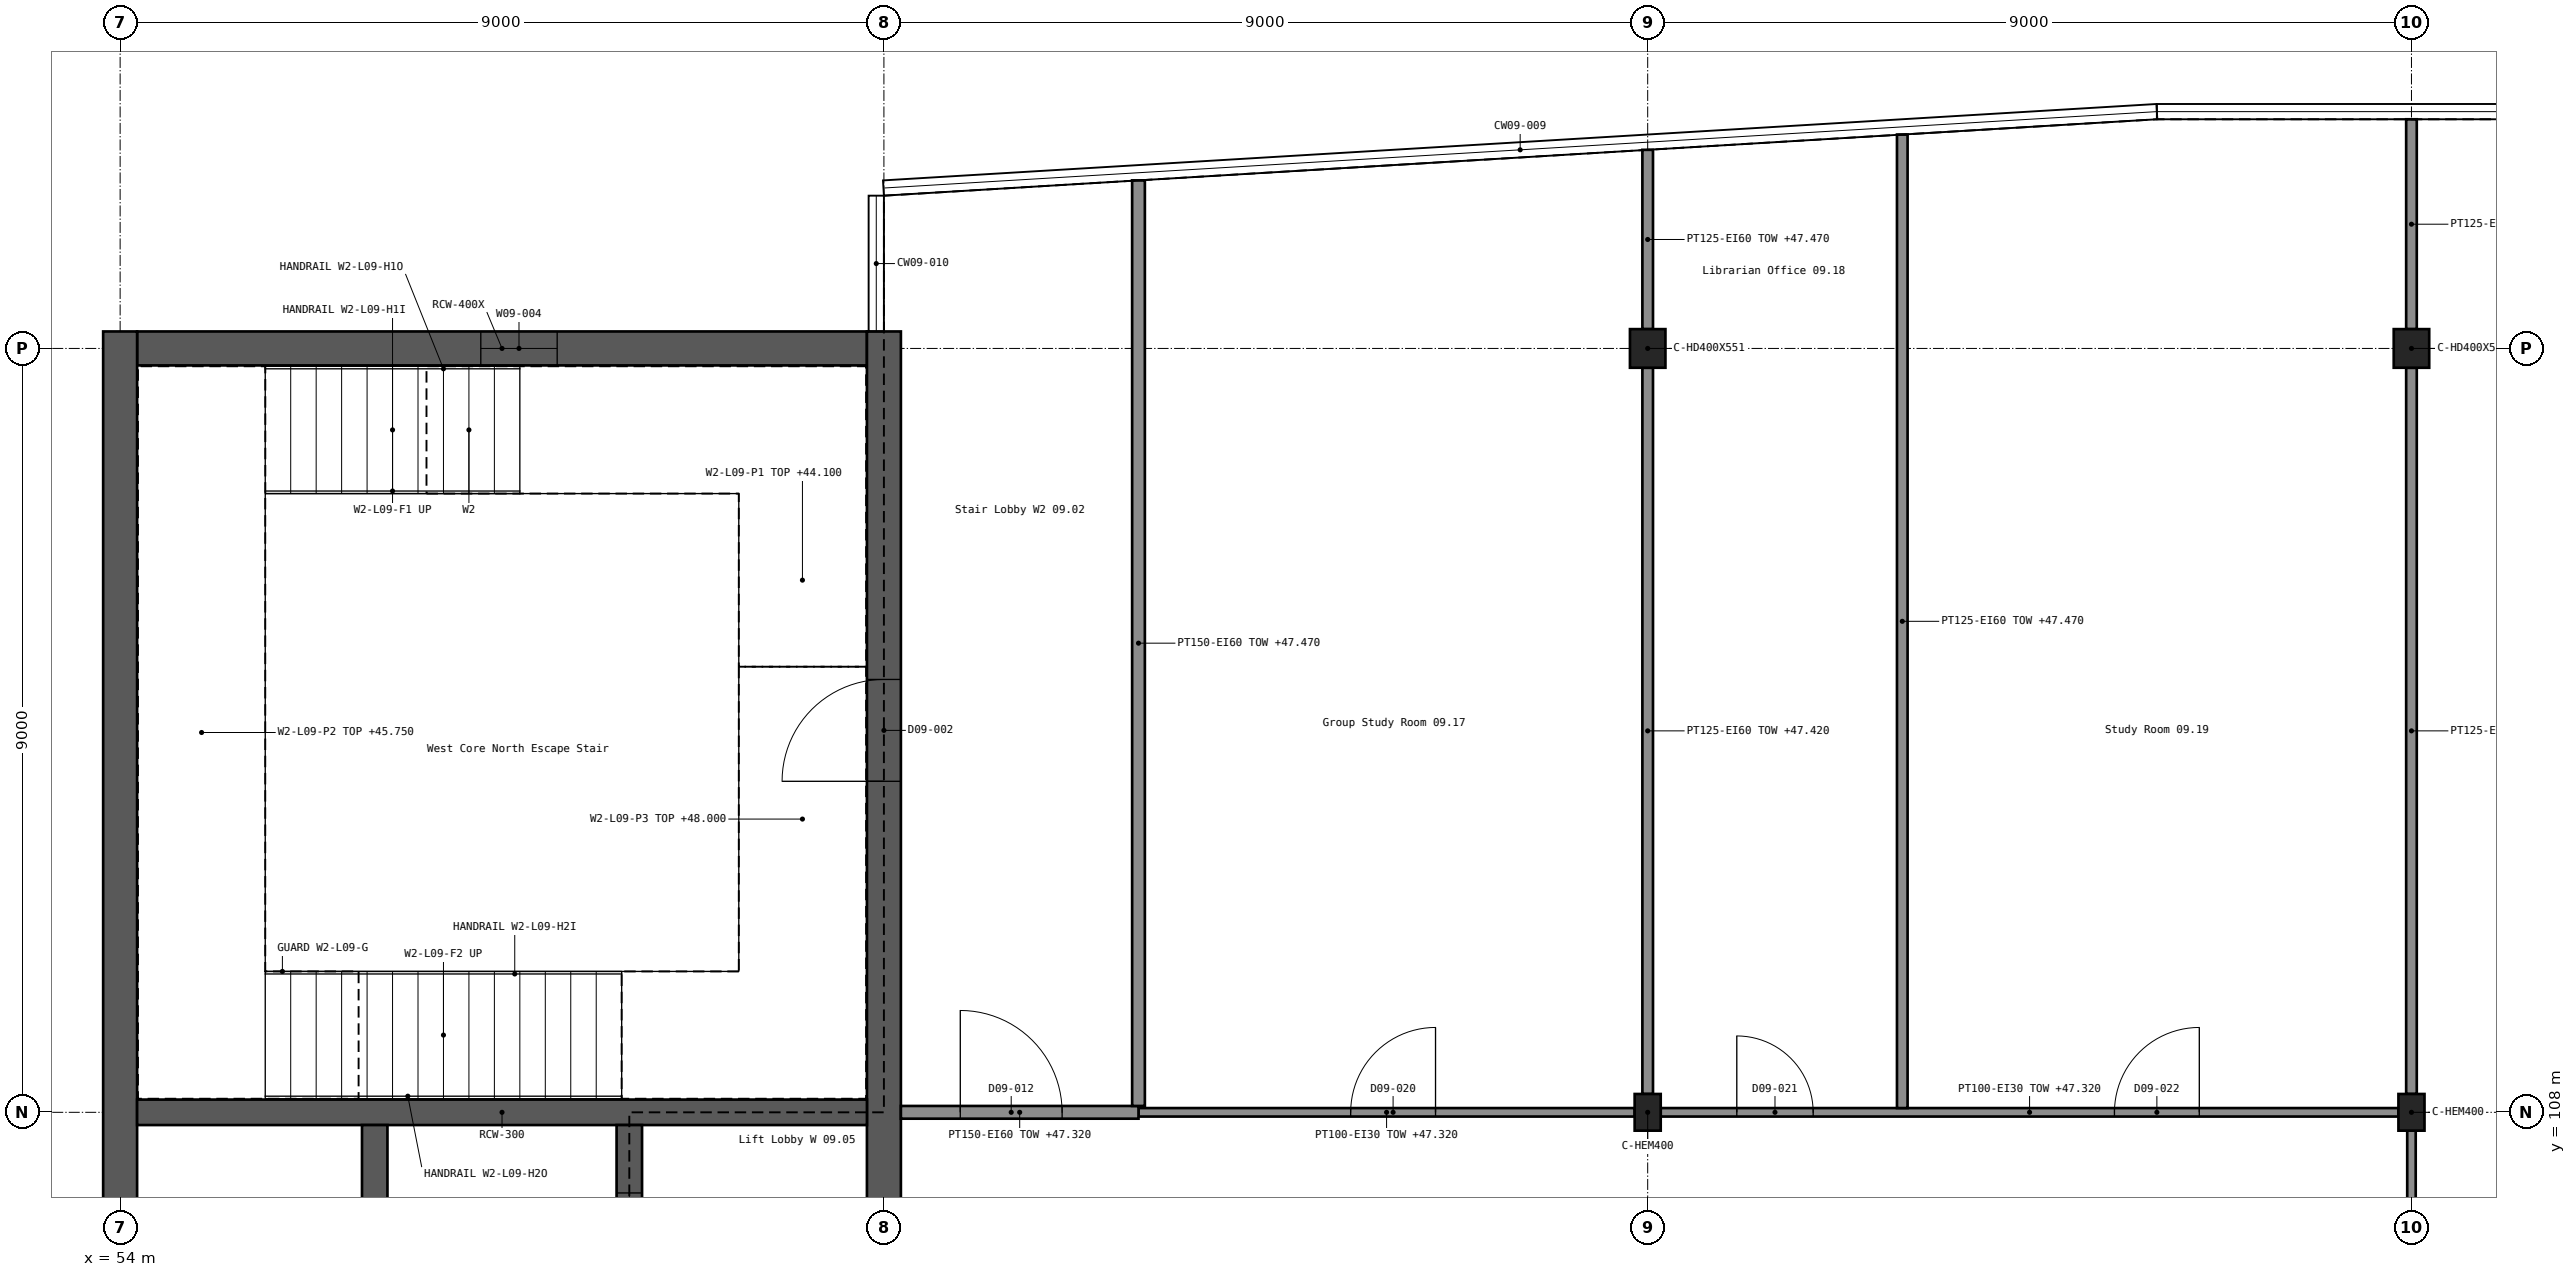
"""IFC4 building model, lengths in metres.
Left out: names, types, materials, properties, quantities, classifications, styles, units other than length and angle.
Written with IfcOpenShell. Run it as: python <this file> out.ifc"""

import sys

from ifc_helpers import new_model, si_unit, direction, frame, frame_2d, origin, origin_2d, place, context, subcontext, project, spatial, rectangle, i_section, extrude, element, fill, save


model = new_model("IFC4")
c1 = context("Model", 3, precision=1e-05, world=origin(), true_north=direction((0.0, 1.0)))
c2 = subcontext(c1, "Body", "Model", "MODEL_VIEW")
j1 = project(units=[si_unit("LENGTHUNIT", "METRE"), si_unit("PLANEANGLEUNIT", "RADIAN")], contexts=[c1])
p1 = place(None, origin())
s1 = spatial("IfcSite", under=j1, at=p1, CompositionType="ELEMENT")
p2 = place(p1, origin())
s2 = spatial("IfcBuilding", under=s1, at=p2, CompositionType="ELEMENT")
p3 = place(p2, frame((0.0, 0.0, 44.1)))
s3 = spatial("IfcBuildingStorey", under=s2, at=p3, CompositionType="ELEMENT", Elevation=44.1)
p4 = place(p3, frame((54.2, 117.0, 0.0), z_axis=(0.0, 0.0, 1.0), x_axis=(1.0, 0.0, 0.0)))
e1 = element("IfcWall", 1, at=p4, inside=s3, PredefinedType="SHEAR", context=c2, shape_type="SweptSolid", body=[
    extrude(rectangle(XDim=8.6, YDim=0.4, at=frame_2d((4.3, 0.0))), origin(), (0.0, 0.0, 1.0), 3.9),
])
p5 = place(p4, frame((4.05, 0.0, 1.2)))
e2 = element("IfcOpeningElement", 2, at=p5, cuts=e1, PredefinedType="OPENING", context=c2, shape_type="SweptSolid", body=[
    extrude(rectangle(XDim=0.9, YDim=1.5, at=frame_2d((0.45, 0.75))), frame((0.0, 0.211, 0.0), z_axis=(0.0, -1.0, 0.0), x_axis=(1.0, 0.0, 0.0)), (0.0, 0.0, 1.0), 0.422),
])
p6 = place(p3, frame((54.0, 89.8, 0.0), z_axis=(0.0, 0.0, 1.0), x_axis=(0.0, 1.0, 0.0)))
e3 = element("IfcWall", 3, at=p6, inside=s3, PredefinedType="SHEAR", context=c2, shape_type="SweptSolid", body=[
    extrude(rectangle(XDim=27.4, YDim=0.4, at=frame_2d((13.7, 0.0))), origin(), (0.0, 0.0, 1.0), 3.9),
])
p7 = place(p3, frame((63.0, 89.8, 0.0), z_axis=(0.0, 0.0, 1.0), x_axis=(0.0, 1.0, 0.0)))
e4 = element("IfcWall", 4, at=p7, inside=s3, PredefinedType="SHEAR", context=c2, shape_type="SweptSolid", body=[
    extrude(rectangle(XDim=27.4, YDim=0.4, at=frame_2d((13.7, 0.0))), origin(), (0.0, 0.0, 1.0), 3.9),
])
p8 = place(p7, frame((4.1, 0.0, 0.0)))
e5 = element("IfcOpeningElement", 5, at=p8, cuts=e4, PredefinedType="OPENING", context=c2, shape_type="SweptSolid", body=[
    extrude(rectangle(XDim=1.2, YDim=2.1, at=frame_2d((0.6, 1.05))), frame((0.0, 0.211, 0.0), z_axis=(0.0, -1.0, 0.0), x_axis=(1.0, 0.0, 0.0)), (0.0, 0.0, 1.0), 0.422),
])
p9 = place(p7, frame((22.1, 0.0, 0.0)))
e6 = element("IfcOpeningElement", 6, at=p9, cuts=e4, PredefinedType="OPENING", context=c2, shape_type="SweptSolid", body=[
    extrude(rectangle(XDim=1.2, YDim=2.1, at=frame_2d((0.6, 1.05))), frame((0.0, 0.211, 0.0), z_axis=(0.0, -1.0, 0.0), x_axis=(1.0, 0.0, 0.0)), (0.0, 0.0, 1.0), 0.422),
])
p10 = place(p7, frame((12.5, 0.0, 0.0)))
e7 = element("IfcOpeningElement", 7, at=p10, cuts=e4, PredefinedType="OPENING", context=c2, shape_type="SweptSolid", body=[
    extrude(rectangle(XDim=2.0, YDim=2.1, at=frame_2d((1.0, 1.05))), frame((0.0, 0.211, 0.0), z_axis=(0.0, -1.0, 0.0), x_axis=(1.0, 0.0, 0.0)), (0.0, 0.0, 1.0), 0.422),
])
p11 = place(p3, frame((54.2, 108.0, 0.0), z_axis=(0.0, 0.0, 1.0), x_axis=(1.0, 0.0, 0.0)))
e8 = element("IfcWall", 8, at=p11, inside=s3, PredefinedType="SHEAR", context=c2, shape_type="SweptSolid", body=[
    extrude(rectangle(XDim=8.6, YDim=0.3, at=frame_2d((4.3, 0.0))), origin(), (0.0, 0.0, 1.0), 3.9),
])
p12 = place(p3, frame((57.0, 99.15, 0.0), z_axis=(0.0, 0.0, 1.0), x_axis=(0.0, 1.0, 0.0)))
e9 = element("IfcWall", 9, at=p12, inside=s3, PredefinedType="SHEAR", context=c2, shape_type="SweptSolid", body=[
    extrude(rectangle(XDim=8.7, YDim=0.3, at=frame_2d((4.35, 0.0))), origin(), (0.0, 0.0, 1.0), 3.9),
])
p13 = place(p3, frame((60.0, 99.15, 0.0), z_axis=(0.0, 0.0, 1.0), x_axis=(0.0, 1.0, 0.0)))
e10 = element("IfcWall", 10, at=p13, inside=s3, PredefinedType="SHEAR", context=c2, shape_type="SweptSolid", body=[
    extrude(rectangle(XDim=8.7, YDim=0.3, at=frame_2d((4.35, 0.0))), origin(), (0.0, 0.0, 1.0), 3.9),
])
p14 = place(p13, frame((0.8, 0.0, 0.0)))
e11 = element("IfcOpeningElement", 11, at=p14, cuts=e10, PredefinedType="OPENING", context=c2, shape_type="SweptSolid", body=[
    extrude(rectangle(XDim=1.1, YDim=2.1, at=frame_2d((0.55, 1.05))), frame((0.0, 0.161, 0.0), z_axis=(0.0, -1.0, 0.0), x_axis=(1.0, 0.0, 0.0)), (0.0, 0.0, 1.0), 0.322),
])
p15 = place(p13, frame((3.8, 0.0, 0.0)))
e12 = element("IfcOpeningElement", 12, at=p15, cuts=e10, PredefinedType="OPENING", context=c2, shape_type="SweptSolid", body=[
    extrude(rectangle(XDim=1.1, YDim=2.1, at=frame_2d((0.55, 1.05))), frame((0.0, 0.161, 0.0), z_axis=(0.0, -1.0, 0.0), x_axis=(1.0, 0.0, 0.0)), (0.0, 0.0, 1.0), 0.322),
])
p16 = place(p13, frame((6.8, 0.0, 0.0)))
e13 = element("IfcOpeningElement", 13, at=p16, cuts=e10, PredefinedType="OPENING", context=c2, shape_type="SweptSolid", body=[
    extrude(rectangle(XDim=1.1, YDim=2.1, at=frame_2d((0.55, 1.05))), frame((0.0, 0.161, 0.0), z_axis=(0.0, -1.0, 0.0), x_axis=(1.0, 0.0, 0.0)), (0.0, 0.0, 1.0), 0.322),
])
for number, where, z_axis, x_axis in (
    (14, (72.0, 108.0, 0.0), (0.0, 0.0, 1.0), (1.0, 0.0, 0.0)),
    (15, (81.0, 108.0, 0.0), (0.0, 0.0, 1.0), (1.0, 0.0, 0.0)),
):
    element("IfcColumn", number, at=place(p3, frame(where, z_axis=z_axis, x_axis=x_axis)), inside=s3, PredefinedType="COLUMN", context=c2, shape_type="SweptSolid", body=[
        extrude(i_section(OverallWidth=0.307, OverallDepth=0.432, WebThickness=0.021, FlangeThickness=0.04, FilletRadius=0.027, at=origin_2d()), origin(), (0.0, 0.0, 1.0), 3.9),
    ])
for number, where, z_axis, x_axis in (
    (16, (72.0, 117.0, 0.0), (0.0, 0.0, 1.0), (1.0, 0.0, 0.0)),
    (17, (81.0, 117.0, 0.0), (0.0, 0.0, 1.0), (1.0, 0.0, 0.0)),
):
    element("IfcColumn", number, at=place(p3, frame(where, z_axis=z_axis, x_axis=x_axis)), inside=s3, PredefinedType="COLUMN", context=c2, shape_type="SweptSolid", body=[
        extrude(i_section(OverallWidth=0.418, OverallDepth=0.455, WebThickness=0.042, FlangeThickness=0.068, FilletRadius=0.015, at=origin_2d()), origin(), (0.0, 0.0, 1.0), 3.9),
    ])
p17 = place(p3, frame((66.0, 108.0, 0.0), z_axis=(0.0, 0.0, 1.0), x_axis=(1.0, 0.0, 0.0)))
e18 = element("IfcWall", 18, at=p17, inside=s3, PredefinedType="PARTITIONING", context=c2, shape_type="SweptSolid", body=[
    extrude(rectangle(XDim=5.846, YDim=0.1, at=frame_2d((2.923, 0.0))), origin(), (0.0, 0.0, 1.0), 3.22),
])
p18 = place(p17, frame((2.5, 0.0, 0.0)))
e19 = element("IfcOpeningElement", 19, at=p18, cuts=e18, PredefinedType="OPENING", context=c2, shape_type="SweptSolid", body=[
    extrude(rectangle(XDim=1.0, YDim=2.1, at=frame_2d((0.5, 1.05))), frame((0.0, 0.061, 0.0), z_axis=(0.0, -1.0, 0.0), x_axis=(1.0, 0.0, 0.0)), (0.0, 0.0, 1.0), 0.122),
])
p19 = place(p3, frame((72.154, 108.0, 0.0), z_axis=(0.0, 0.0, 1.0), x_axis=(1.0, 0.0, 0.0)))
e20 = element("IfcWall", 20, at=p19, inside=s3, PredefinedType="PARTITIONING", context=c2, shape_type="SweptSolid", body=[
    extrude(rectangle(XDim=8.693, YDim=0.1, at=frame_2d((4.346, 0.0))), origin(), (0.0, 0.0, 1.0), 3.22),
])
p20 = place(p19, frame((0.896, 0.0, 0.0)))
e21 = element("IfcOpeningElement", 21, at=p20, cuts=e20, PredefinedType="OPENING", context=c2, shape_type="SweptSolid", body=[
    extrude(rectangle(XDim=0.9, YDim=2.1, at=frame_2d((0.45, 1.05))), frame((0.0, 0.061, 0.0), z_axis=(0.0, -1.0, 0.0), x_axis=(1.0, 0.0, 0.0)), (0.0, 0.0, 1.0), 0.122),
])
p21 = place(p19, frame((5.346, 0.0, 0.0)))
e22 = element("IfcOpeningElement", 22, at=p21, cuts=e20, PredefinedType="OPENING", context=c2, shape_type="SweptSolid", body=[
    extrude(rectangle(XDim=1.0, YDim=2.1, at=frame_2d((0.5, 1.05))), frame((0.0, 0.061, 0.0), z_axis=(0.0, -1.0, 0.0), x_axis=(1.0, 0.0, 0.0)), (0.0, 0.0, 1.0), 0.122),
])
p22 = place(p3, frame((63.2, 108.0, 0.0), z_axis=(0.0, 0.0, 1.0), x_axis=(1.0, 0.0, 0.0)))
e23 = element("IfcWall", 23, at=p22, inside=s3, PredefinedType="PARTITIONING", context=c2, shape_type="SweptSolid", body=[
    extrude(rectangle(XDim=2.8, YDim=0.15, at=frame_2d((1.4, 0.0))), origin(), (0.0, 0.0, 1.0), 3.22),
])
p23 = place(p22, frame((0.7, 0.0, 0.0)))
e24 = element("IfcOpeningElement", 24, at=p23, cuts=e23, PredefinedType="OPENING", context=c2, shape_type="SweptSolid", body=[
    extrude(rectangle(XDim=1.2, YDim=2.1, at=frame_2d((0.6, 1.05))), frame((0.0, 0.086, 0.0), z_axis=(0.0, -1.0, 0.0), x_axis=(1.0, 0.0, 0.0)), (0.0, 0.0, 1.0), 0.172),
])
p24 = place(p3, frame((66.0, 108.075, 0.0), z_axis=(0.0, 0.0, 1.0), x_axis=(0.0, 1.0, 0.0)))
e25 = element("IfcWall", 25, at=p24, inside=s3, PredefinedType="PARTITIONING", context=c2, shape_type="SweptSolid", body=[
    extrude(rectangle(XDim=10.905, YDim=0.15, at=frame_2d((5.453, 0.0))), origin(), (0.0, 0.0, 1.0), 3.37),
])
p25 = place(p3, frame((72.0, 108.216, 0.0), z_axis=(0.0, 0.0, 1.0), x_axis=(0.0, 1.0, 0.0)))
e26 = element("IfcWall", 26, at=p25, inside=s3, PredefinedType="PARTITIONING", context=c2, shape_type="SweptSolid", body=[
    extrude(rectangle(XDim=8.556, YDim=0.125, at=frame_2d((4.278, 0.0))), origin(), (0.0, 0.0, 1.0), 3.32),
])
p26 = place(p3, frame((72.0, 117.228, 0.0), z_axis=(0.0, 0.0, 1.0), x_axis=(0.0, 1.0, 0.0)))
e27 = element("IfcWall", 27, at=p26, inside=s3, PredefinedType="PARTITIONING", context=c2, shape_type="SweptSolid", body=[
    extrude(rectangle(XDim=2.113, YDim=0.125, at=frame_2d((1.056, 0.0))), origin(), (0.0, 0.0, 1.0), 3.37),
])
p27 = place(p3, frame((75.0, 108.05, 0.0), z_axis=(0.0, 0.0, 1.0), x_axis=(0.0, 1.0, 0.0)))
e28 = element("IfcWall", 28, at=p27, inside=s3, PredefinedType="PARTITIONING", context=c2, shape_type="SweptSolid", body=[
    extrude(rectangle(XDim=11.47, YDim=0.125, at=frame_2d((5.735, 0.0))), origin(), (0.0, 0.0, 1.0), 3.37),
])
p28 = place(p3, frame((81.0, 99.216, 0.0), z_axis=(0.0, 0.0, 1.0), x_axis=(0.0, 1.0, 0.0)))
e29 = element("IfcWall", 29, at=p28, inside=s3, PredefinedType="PARTITIONING", context=c2, shape_type="SweptSolid", body=[
    extrude(rectangle(XDim=8.568, YDim=0.1, at=frame_2d((4.284, 0.0))), origin(), (0.0, 0.0, 1.0), 3.32),
])
p29 = place(p28, frame((5.659, 0.0, 0.0)))
e30 = element("IfcOpeningElement", 30, at=p29, cuts=e29, PredefinedType="OPENING", context=c2, shape_type="SweptSolid", body=[
    extrude(rectangle(XDim=2.0, YDim=2.4, at=frame_2d((1.0, 1.2))), frame((0.0, 0.061, 0.0), z_axis=(0.0, -1.0, 0.0), x_axis=(1.0, 0.0, 0.0)), (0.0, 0.0, 1.0), 0.122),
])
p30 = place(p3, frame((81.0, 108.216, 0.0), z_axis=(0.0, 0.0, 1.0), x_axis=(0.0, 1.0, 0.0)))
e31 = element("IfcWall", 31, at=p30, inside=s3, PredefinedType="PARTITIONING", context=c2, shape_type="SweptSolid", body=[
    extrude(rectangle(XDim=8.556, YDim=0.125, at=frame_2d((4.278, 0.0))), origin(), (0.0, 0.0, 1.0), 3.32),
])
p31 = place(p3, frame((81.0, 117.228, 0.0), z_axis=(0.0, 0.0, 1.0), x_axis=(0.0, 1.0, 0.0)))
e32 = element("IfcWall", 32, at=p31, inside=s3, PredefinedType="PARTITIONING", context=c2, shape_type="SweptSolid", body=[
    extrude(rectangle(XDim=2.472, YDim=0.125, at=frame_2d((1.236, 0.0))), origin(), (0.0, 0.0, 1.0), 3.37),
])
p32 = place(p5, origin())
e33 = element("IfcWindow", 33, at=p32, inside=s3, PartitioningType="SINGLE_PANEL", PredefinedType="WINDOW", context=c2, shape_type="SweptSolid", body=[
    extrude(rectangle(XDim=0.9, YDim=1.5, at=frame_2d((0.45, 0.75))), frame((0.0, 0.03, 0.0), z_axis=(0.0, -1.0, 0.0), x_axis=(1.0, 0.0, 0.0)), (0.0, 0.0, 1.0), 0.06),
])
fill(e2, e33)
p33 = place(p9, origin())
e34 = element("IfcDoor", 34, at=p33, inside=s3, OperationType="SINGLE_SWING_LEFT", PredefinedType="DOOR", context=c2, shape_type="SweptSolid", body=[
    extrude(rectangle(XDim=1.2, YDim=2.1, at=frame_2d((0.6, 1.05))), frame((0.0, 0.025, 0.0), z_axis=(0.0, -1.0, 0.0), x_axis=(1.0, 0.0, 0.0)), (0.0, 0.0, 1.0), 0.05),
])
fill(e6, e34)
p34 = place(p16, origin())
e35 = element("IfcDoor", 35, at=p34, inside=s3, OperationType="DOUBLE_DOOR_SLIDING", PredefinedType="DOOR", context=c2, shape_type="SweptSolid", body=[
    extrude(rectangle(XDim=1.1, YDim=2.1, at=frame_2d((0.55, 1.05))), frame((0.0, 0.025, 0.0), z_axis=(0.0, -1.0, 0.0), x_axis=(1.0, 0.0, 0.0)), (0.0, 0.0, 1.0), 0.05),
])
fill(e13, e35)
p35 = place(p23, origin())
e36 = element("IfcDoor", 36, at=p35, inside=s3, OperationType="SINGLE_SWING_LEFT", PredefinedType="DOOR", context=c2, shape_type="SweptSolid", body=[
    extrude(rectangle(XDim=1.2, YDim=2.1, at=frame_2d((0.6, 1.05))), frame((0.0, 0.025, 0.0), z_axis=(0.0, -1.0, 0.0), x_axis=(1.0, 0.0, 0.0)), (0.0, 0.0, 1.0), 0.05),
])
fill(e24, e36)
p36 = place(p18, origin())
e37 = element("IfcDoor", 37, at=p36, inside=s3, OperationType="SINGLE_SWING_RIGHT", PredefinedType="DOOR", context=c2, shape_type="SweptSolid", body=[
    extrude(rectangle(XDim=1.0, YDim=2.1, at=frame_2d((0.5, 1.05))), frame((0.0, 0.025, 0.0), z_axis=(0.0, -1.0, 0.0), x_axis=(1.0, 0.0, 0.0)), (0.0, 0.0, 1.0), 0.05),
])
fill(e19, e37)
p37 = place(p20, origin())
e38 = element("IfcDoor", 38, at=p37, inside=s3, OperationType="SINGLE_SWING_LEFT", PredefinedType="DOOR", context=c2, shape_type="SweptSolid", body=[
    extrude(rectangle(XDim=0.9, YDim=2.1, at=frame_2d((0.45, 1.05))), frame((0.0, 0.025, 0.0), z_axis=(0.0, -1.0, 0.0), x_axis=(1.0, 0.0, 0.0)), (0.0, 0.0, 1.0), 0.05),
])
fill(e21, e38)
p38 = place(p21, origin())
e39 = element("IfcDoor", 39, at=p38, inside=s3, OperationType="SINGLE_SWING_RIGHT", PredefinedType="DOOR", context=c2, shape_type="SweptSolid", body=[
    extrude(rectangle(XDim=1.0, YDim=2.1, at=frame_2d((0.5, 1.05))), frame((0.0, 0.025, 0.0), z_axis=(0.0, -1.0, 0.0), x_axis=(1.0, 0.0, 0.0)), (0.0, 0.0, 1.0), 0.05),
])
fill(e22, e39)
save(model, sys.argv[1])
